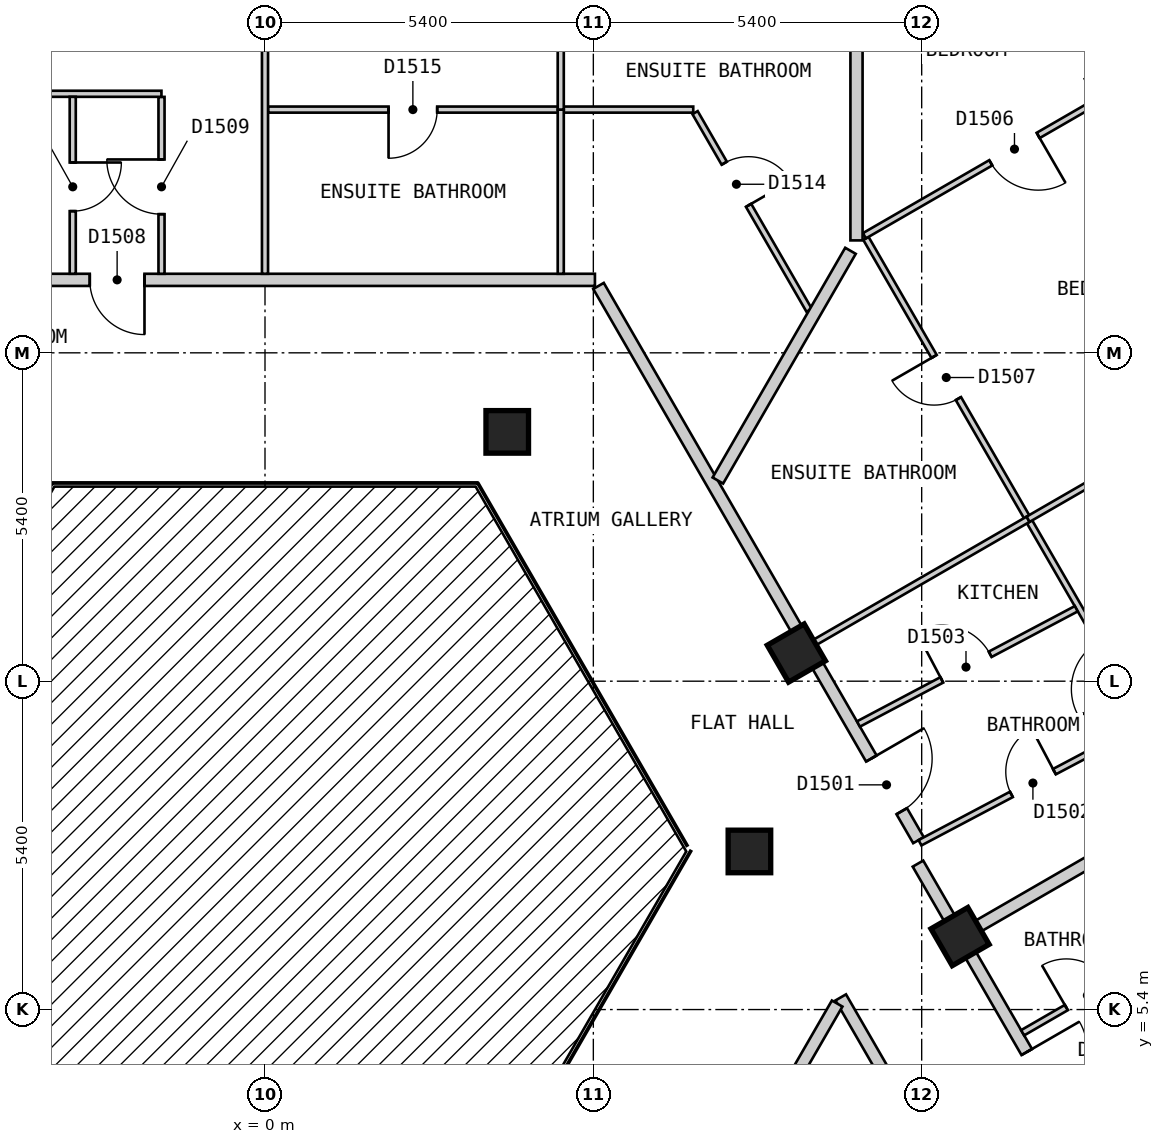
"""IFC4 building model, lengths in metres.
Left out: names, types, materials, properties, quantities, classifications, styles, units other than length and angle.
Written with IfcOpenShell. Run it as: python <this file> out.ifc"""

import sys

from ifc_helpers import new_model, si_unit, direction, frame, frame_2d, origin, origin_2d, place, context, subcontext, project, spatial, rectangle, extrude, element, fill, save


model = new_model("IFC4")
c1 = context("Model", 3, precision=1e-05, world=origin(), true_north=direction((0.0, 1.0)))
c2 = subcontext(c1, "Body", "Model", "MODEL_VIEW")
j1 = project(units=[si_unit("LENGTHUNIT", "METRE"), si_unit("PLANEANGLEUNIT", "RADIAN")], contexts=[c1])
p1 = place(None, origin())
s1 = spatial("IfcSite", under=j1, at=p1, CompositionType="ELEMENT")
p2 = place(p1, origin())
s2 = spatial("IfcBuilding", under=s1, at=p2, CompositionType="ELEMENT")
p3 = place(p2, frame((0.0, 0.0, 184.2)))
s3 = spatial("IfcBuildingStorey", under=s2, at=p3, CompositionType="ELEMENT", Elevation=184.2)
for number, where, z_axis, x_axis in (
    (1, (11.431, 6.6, 0.0), (0.0, 0.0, 1.0), (-0.5, 0.866, 0.0)),
    (2, (7.967, 8.0, 0.0), (0.0, 0.0, 1.0), (1.0, 0.0, 0.0)),
    (3, (8.739, 11.263, 0.0), (0.0, 0.0, 1.0), (-0.5, 0.866, 0.0)),
    (4, (3.984, 14.9, 0.0), (0.0, 0.0, 1.0), (1.0, 0.0, 0.0)),
):
    element("IfcColumn", number, at=place(p3, frame(where, z_axis=z_axis, x_axis=x_axis)), inside=s3, PredefinedType="COLUMN", context=c2, shape_type="SweptSolid", body=[
        extrude(rectangle(XDim=0.7, YDim=0.7, at=origin_2d()), origin(), (0.0, 0.0, 1.0), 3.0),
    ])
p4 = place(p3, frame((9.469, 5.6, 0.0), z_axis=(0.0, 0.0, 1.0), x_axis=(0.499964524401, -0.866045884662, 0.0)))
e5 = element("IfcWall", 5, at=p4, inside=s3, PredefinedType="PARTITIONING", context=c2, shape_type="SweptSolid", body=[
    extrude(rectangle(XDim=7.042, YDim=0.2, at=frame_2d((3.521, 0.0))), origin(), (0.0, 0.0, 1.0), 2.7),
])
p5 = place(p4, frame((3.129, 0.0, 0.0)))
e6 = element("IfcOpeningElement", 6, at=p5, cuts=e5, PredefinedType="OPENING", context=c2, shape_type="SweptSolid", body=[
    extrude(rectangle(XDim=0.9, YDim=2.1, at=frame_2d((0.45, 1.05))), frame((0.0, 0.11, 0.0), z_axis=(0.0, -1.0, 0.0), x_axis=(1.0, 0.0, 0.0)), (0.0, 0.0, 1.0), 0.22),
])
p6 = place(p3, frame((10.739, 7.8, 0.0), z_axis=(0.0, 0.0, 1.0), x_axis=(0.500023726918, -0.866011704609, 0.0)))
e7 = element("IfcWall", 7, at=p6, inside=s3, PredefinedType="PARTITIONING", context=c2, shape_type="SweptSolid", body=[
    extrude(rectangle(XDim=9.47, YDim=0.2, at=frame_2d((4.735, 0.0))), origin(), (0.0, 0.0, 1.0), 2.7),
])
p7 = place(p6, frame((8.168, 0.0, 0.0)))
e8 = element("IfcOpeningElement", 8, at=p7, cuts=e7, PredefinedType="OPENING", context=c2, shape_type="SweptSolid", body=[
    extrude(rectangle(XDim=1.0, YDim=2.1, at=frame_2d((0.5, 1.05))), frame((0.0, 0.11, 0.0), z_axis=(0.0, -1.0, 0.0), x_axis=(1.0, 0.0, 0.0)), (0.0, 0.0, 1.0), 0.22),
])
p8 = place(p6, frame((3.578, 0.0, 0.0)))
e9 = element("IfcOpeningElement", 9, at=p8, cuts=e7, PredefinedType="OPENING", context=c2, shape_type="SweptSolid", body=[
    extrude(rectangle(XDim=1.0, YDim=2.1, at=frame_2d((0.5, 1.05))), frame((0.0, 0.11, 0.0), z_axis=(0.0, -1.0, 0.0), x_axis=(1.0, 0.0, 0.0)), (0.0, 0.0, 1.0), 0.22),
])
p9 = place(p3, frame((5.485, 17.3, 0.0), z_axis=(0.0, 0.0, 1.0), x_axis=(0.499998905622, -0.866026035623, 0.0)))
e10 = element("IfcWall", 10, at=p9, inside=s3, PredefinedType="PARTITIONING", context=c2, shape_type="SweptSolid", body=[
    extrude(rectangle(XDim=10.524, YDim=0.2, at=frame_2d((5.262, 0.0))), origin(), (0.0, 0.0, 1.0), 2.7),
])
p10 = place(p9, frame((8.974, 0.0, 0.0)))
e11 = element("IfcOpeningElement", 11, at=p10, cuts=e10, PredefinedType="OPENING", context=c2, shape_type="SweptSolid", body=[
    extrude(rectangle(XDim=1.0, YDim=2.1, at=frame_2d((0.5, 1.05))), frame((0.0, 0.11, 0.0), z_axis=(0.0, -1.0, 0.0), x_axis=(1.0, 0.0, 0.0)), (0.0, 0.0, 1.0), 0.22),
])
p11 = place(p3, frame((-5.311, 17.4, 0.0), z_axis=(0.0, 0.0, 1.0), x_axis=(1.0, 0.0, 0.0)))
e12 = element("IfcWall", 12, at=p11, inside=s3, PredefinedType="PARTITIONING", context=c2, shape_type="SweptSolid", body=[
    extrude(rectangle(XDim=10.737, YDim=0.2, at=frame_2d((5.369, 0.0))), origin(), (0.0, 0.0, 1.0), 2.7),
])
p12 = place(p11, frame((2.429, 0.0, 0.0)))
e13 = element("IfcOpeningElement", 13, at=p12, cuts=e12, PredefinedType="OPENING", context=c2, shape_type="SweptSolid", body=[
    extrude(rectangle(XDim=0.9, YDim=2.1, at=frame_2d((0.45, 1.05))), frame((0.0, 0.11, 0.0), z_axis=(0.0, -1.0, 0.0), x_axis=(1.0, 0.0, 0.0)), (0.0, 0.0, 1.0), 0.22),
])
p13 = place(p3, frame((7.028, 1.373, 0.0), z_axis=(0.0, 0.0, 1.0), x_axis=(0.499953126767, 0.866052464367, 0.0)))
e14 = element("IfcWall", 14, at=p13, inside=s3, PredefinedType="PARTITIONING", context=c2, shape_type="SweptSolid", body=[
    extrude(rectangle(XDim=4.764, YDim=0.2, at=frame_2d((2.382, 0.0))), origin(), (0.0, 0.0, 1.0), 2.7),
])
p14 = place(p3, frame((7.073, 20.15, 0.0), z_axis=(0.0, 0.0, 1.0), x_axis=(0.499917691695, -0.866072919292, 0.0)))
e15 = element("IfcWall", 15, at=p14, inside=s3, PredefinedType="PARTITIONING", context=c2, shape_type="SweptSolid", body=[
    extrude(rectangle(XDim=3.753, YDim=0.1, at=frame_2d((1.876, 0.0))), origin(), (0.0, 0.0, 1.0), 2.7),
])
p15 = place(p14, frame((0.96, 0.0, 0.0)))
e16 = element("IfcOpeningElement", 16, at=p15, cuts=e15, PredefinedType="OPENING", context=c2, shape_type="SweptSolid", body=[
    extrude(rectangle(XDim=0.8, YDim=2.1, at=frame_2d((0.4, 1.05))), frame((0.0, 0.06, 0.0), z_axis=(0.0, -1.0, 0.0), x_axis=(1.0, 0.0, 0.0)), (0.0, 0.0, 1.0), 0.12),
])
p16 = place(p3, frame((9.883, 18.082, 0.0), z_axis=(0.0, 0.0, 1.0), x_axis=(0.500004428835, -0.86602284678, 0.0)))
e17 = element("IfcWall", 17, at=p16, inside=s3, PredefinedType="PARTITIONING", context=c2, shape_type="SweptSolid", body=[
    extrude(rectangle(XDim=10.618, YDim=0.1, at=frame_2d((5.309, 0.0))), origin(), (0.0, 0.0, 1.0), 2.7),
])
p17 = place(p16, frame((7.657, 0.0, 0.0)))
e18 = element("IfcOpeningElement", 18, at=p17, cuts=e17, PredefinedType="OPENING", context=c2, shape_type="SweptSolid", body=[
    extrude(rectangle(XDim=0.9, YDim=2.1, at=frame_2d((0.45, 1.05))), frame((0.0, 0.06, 0.0), z_axis=(0.0, -1.0, 0.0), x_axis=(1.0, 0.0, 0.0)), (0.0, 0.0, 1.0), 0.12),
])
p18 = place(p16, frame((2.242, 0.0, 0.0)))
e19 = element("IfcOpeningElement", 19, at=p18, cuts=e17, PredefinedType="OPENING", context=c2, shape_type="SweptSolid", body=[
    extrude(rectangle(XDim=0.8, YDim=2.1, at=frame_2d((0.4, 1.05))), frame((0.0, 0.06, 0.0), z_axis=(0.0, -1.0, 0.0), x_axis=(1.0, 0.0, 0.0)), (0.0, 0.0, 1.0), 0.12),
])
p19 = place(p3, frame((-1.702, 20.409, 0.0), z_axis=(0.0, 0.0, 1.0), x_axis=(0.0, -1.0, 0.0)))
e20 = element("IfcWall", 20, at=p19, inside=s3, PredefinedType="PARTITIONING", context=c2, shape_type="SweptSolid", body=[
    extrude(rectangle(XDim=2.909, YDim=0.1, at=frame_2d((1.455, 0.0))), origin(), (0.0, 0.0, 1.0), 2.7),
])
p20 = place(p19, frame((1.029, 0.0, 0.0)))
e21 = element("IfcOpeningElement", 21, at=p20, cuts=e20, PredefinedType="OPENING", context=c2, shape_type="SweptSolid", body=[
    extrude(rectangle(XDim=0.9, YDim=2.1, at=frame_2d((0.45, 1.05))), frame((0.0, 0.06, 0.0), z_axis=(0.0, -1.0, 0.0), x_axis=(1.0, 0.0, 0.0)), (0.0, 0.0, 1.0), 0.12),
])
p21 = place(p3, frame((0.05, 20.2, 0.0), z_axis=(0.0, 0.0, 1.0), x_axis=(1.0, 0.0, 0.0)))
e22 = element("IfcWall", 22, at=p21, inside=s3, PredefinedType="PARTITIONING", context=c2, shape_type="SweptSolid", body=[
    extrude(rectangle(XDim=6.993, YDim=0.1, at=frame_2d((3.497, 0.0))), origin(), (0.0, 0.0, 1.0), 2.7),
])
p22 = place(p21, frame((1.982, 0.0, 0.0)))
e23 = element("IfcOpeningElement", 23, at=p22, cuts=e22, PredefinedType="OPENING", context=c2, shape_type="SweptSolid", body=[
    extrude(rectangle(XDim=0.8, YDim=2.1, at=frame_2d((0.4, 1.05))), frame((0.0, 0.06, 0.0), z_axis=(0.0, -1.0, 0.0), x_axis=(1.0, 0.0, 0.0)), (0.0, 0.0, 1.0), 0.12),
])
p23 = place(p3, frame((-4.814, 20.46, 0.0), z_axis=(0.0, 0.0, 1.0), x_axis=(1.0, 0.0, 0.0)))
e24 = element("IfcWall", 24, at=p23, inside=s3, PredefinedType="PARTITIONING", context=c2, shape_type="SweptSolid", body=[
    extrude(rectangle(XDim=3.111, YDim=0.1, at=frame_2d((1.556, 0.0))), origin(), (0.0, 0.0, 1.0), 2.7),
])
p24 = place(p3, frame((4.864, 17.5, 0.0), z_axis=(0.0, 0.0, 1.0), x_axis=(0.0, 1.0, 0.0)))
e25 = element("IfcWall", 25, at=p24, inside=s3, PredefinedType="PARTITIONING", context=c2, shape_type="SweptSolid", body=[
    extrude(rectangle(XDim=2.7, YDim=0.1, at=frame_2d((1.35, 0.0))), origin(), (0.0, 0.0, 1.0), 2.7),
])
p25 = place(p3, frame((0.0, 17.5, 0.0), z_axis=(0.0, 0.0, 1.0), x_axis=(0.0, 1.0, 0.0)))
e26 = element("IfcWall", 26, at=p25, inside=s3, PredefinedType="PARTITIONING", context=c2, shape_type="SweptSolid", body=[
    extrude(rectangle(XDim=6.4, YDim=0.1, at=frame_2d((3.2, 0.0))), origin(), (0.0, 0.0, 1.0), 2.7),
])
p26 = place(p25, frame((4.1, 0.0, 0.0)))
e27 = element("IfcOpeningElement", 27, at=p26, cuts=e26, PredefinedType="OPENING", context=c2, shape_type="SweptSolid", body=[
    extrude(rectangle(XDim=0.9, YDim=2.1, at=frame_2d((0.45, 1.05))), frame((0.0, 0.06, 0.0), z_axis=(0.0, -1.0, 0.0), x_axis=(1.0, 0.0, 0.0)), (0.0, 0.0, 1.0), 0.12),
])
p27 = place(p3, frame((-3.162, 17.5, 0.0), z_axis=(0.0, 0.0, 1.0), x_axis=(0.0, 1.0, 0.0)))
e28 = element("IfcWall", 28, at=p27, inside=s3, PredefinedType="PARTITIONING", context=c2, shape_type="SweptSolid", body=[
    extrude(rectangle(XDim=2.91, YDim=0.1, at=frame_2d((1.455, 0.0))), origin(), (0.0, 0.0, 1.0), 2.7),
])
p28 = place(p27, frame((1.03, 0.0, 0.0)))
e29 = element("IfcOpeningElement", 29, at=p28, cuts=e28, PredefinedType="OPENING", context=c2, shape_type="SweptSolid", body=[
    extrude(rectangle(XDim=0.8, YDim=2.1, at=frame_2d((0.4, 1.05))), frame((0.0, 0.06, 0.0), z_axis=(0.0, -1.0, 0.0), x_axis=(1.0, 0.0, 0.0)), (0.0, 0.0, 1.0), 0.12),
])
p29 = place(p3, frame((9.76, 10.096, 0.0), z_axis=(0.0, 0.0, 1.0), x_axis=(0.883925629136, 0.467627503636, 0.0)))
e30 = element("IfcWall", 30, at=p29, inside=s3, PredefinedType="PARTITIONING", context=c2, shape_type="SweptSolid", body=[
    extrude(rectangle(XDim=4.052, YDim=0.1, at=frame_2d((2.026, 0.0))), origin(), (0.0, 0.0, 1.0), 2.7),
])
p30 = place(p29, frame((1.551, 0.0, 0.0)))
e31 = element("IfcOpeningElement", 31, at=p30, cuts=e30, PredefinedType="OPENING", context=c2, shape_type="SweptSolid", body=[
    extrude(rectangle(XDim=0.9, YDim=2.1, at=frame_2d((0.45, 1.05))), frame((0.0, 0.06, 0.0), z_axis=(0.0, -1.0, 0.0), x_axis=(1.0, 0.0, 0.0)), (0.0, 0.0, 1.0), 0.12),
])
p31 = place(p3, frame((10.772, 8.143, 0.0), z_axis=(0.0, 0.0, 1.0), x_axis=(0.884049480227, 0.467393320995, 0.0)))
e32 = element("IfcWall", 32, at=p31, inside=s3, PredefinedType="PARTITIONING", context=c2, shape_type="SweptSolid", body=[
    extrude(rectangle(XDim=4.153, YDim=0.1, at=frame_2d((2.076, 0.0))), origin(), (0.0, 0.0, 1.0), 2.7),
])
p32 = place(p31, frame((1.701, 0.0, 0.0)))
e33 = element("IfcOpeningElement", 33, at=p32, cuts=e32, PredefinedType="OPENING", context=c2, shape_type="SweptSolid", body=[
    extrude(rectangle(XDim=0.8, YDim=2.1, at=frame_2d((0.4, 1.05))), frame((0.0, 0.06, 0.0), z_axis=(0.0, -1.0, 0.0), x_axis=(1.0, 0.0, 0.0)), (0.0, 0.0, 1.0), 0.12),
])
p33 = place(p3, frame((13.268, 3.619, 0.0), z_axis=(0.0, 0.0, 1.0), x_axis=(0.865902724456, 0.500212426655, 0.0)))
e34 = element("IfcWall", 34, at=p33, inside=s3, PredefinedType="PARTITIONING", context=c2, shape_type="SweptSolid", body=[
    extrude(rectangle(XDim=2.559, YDim=0.1, at=frame_2d((1.28, 0.0))), origin(), (0.0, 0.0, 1.0), 2.7),
])
p34 = place(p33, frame((0.78, 0.0, 0.0)))
e35 = element("IfcOpeningElement", 35, at=p34, cuts=e34, PredefinedType="OPENING", context=c2, shape_type="SweptSolid", body=[
    extrude(rectangle(XDim=0.9, YDim=2.1, at=frame_2d((0.45, 1.05))), frame((0.0, 0.06, 0.0), z_axis=(0.0, -1.0, 0.0), x_axis=(1.0, 0.0, 0.0)), (0.0, 0.0, 1.0), 0.12),
])
p35 = place(p3, frame((12.46, 5.018, 0.0), z_axis=(0.0, 0.0, 1.0), x_axis=(0.866080321209, 0.499904868165, 0.0)))
e36 = element("IfcWall", 36, at=p35, inside=s3, PredefinedType="PARTITIONING", context=c2, shape_type="SweptSolid", body=[
    extrude(rectangle(XDim=2.51, YDim=0.1, at=frame_2d((1.255, 0.0))), origin(), (0.0, 0.0, 1.0), 2.7),
])
p36 = place(p35, frame((0.83, 0.0, 0.0)))
e37 = element("IfcOpeningElement", 37, at=p36, cuts=e36, PredefinedType="OPENING", context=c2, shape_type="SweptSolid", body=[
    extrude(rectangle(XDim=0.8, YDim=2.1, at=frame_2d((0.4, 1.05))), frame((0.0, 0.06, 0.0), z_axis=(0.0, -1.0, 0.0), x_axis=(1.0, 0.0, 0.0)), (0.0, 0.0, 1.0), 0.12),
])
p37 = place(p3, frame((8.999, 11.413, 0.0), z_axis=(0.0, 0.0, 1.0), x_axis=(0.86606561423, 0.499930346997, 0.0)))
e38 = element("IfcWall", 38, at=p37, inside=s3, PredefinedType="PARTITIONING", context=c2, shape_type="SweptSolid", body=[
    extrude(rectangle(XDim=4.1, YDim=0.1, at=frame_2d((2.05, 0.0))), origin(), (0.0, 0.0, 1.0), 2.7),
])
p38 = place(p3, frame((9.858, 18.125, 0.0), z_axis=(0.0, 0.0, 1.0), x_axis=(0.866004402611, 0.500036373335, 0.0)))
e39 = element("IfcWall", 39, at=p38, inside=s3, PredefinedType="PARTITIONING", context=c2, shape_type="SweptSolid", body=[
    extrude(rectangle(XDim=5.7, YDim=0.1, at=frame_2d((2.85, 0.0))), origin(), (0.0, 0.0, 1.0), 2.7),
])
p39 = place(p38, frame((2.4, 0.0, 0.0)))
e40 = element("IfcOpeningElement", 40, at=p39, cuts=e39, PredefinedType="OPENING", context=c2, shape_type="SweptSolid", body=[
    extrude(rectangle(XDim=0.9, YDim=2.1, at=frame_2d((0.45, 1.05))), frame((0.0, 0.06, 0.0), z_axis=(0.0, -1.0, 0.0), x_axis=(1.0, 0.0, 0.0)), (0.0, 0.0, 1.0), 0.12),
])
p40 = place(p3, frame((7.448, 14.1, 0.0), z_axis=(0.0, 0.0, 1.0), x_axis=(0.499961462843, 0.866047652079, 0.0)))
e41 = element("IfcWall", 41, at=p40, inside=s3, PredefinedType="PARTITIONING", context=c2, shape_type="SweptSolid", body=[
    extrude(rectangle(XDim=4.362, YDim=0.2, at=frame_2d((2.181, 0.0))), origin(), (0.0, 0.0, 1.0), 2.7),
])
p41 = place(p3, frame((9.728, 18.049, 0.0), z_axis=(0.0, 0.0, 1.0), x_axis=(0.0, 1.0, 0.0)))
e42 = element("IfcWall", 42, at=p41, inside=s3, PredefinedType="PARTITIONING", context=c2, shape_type="SweptSolid", body=[
    extrude(rectangle(XDim=5.851, YDim=0.2, at=frame_2d((2.925, 0.0))), origin(), (0.0, 0.0, 1.0), 2.7),
])
p42 = place(p3, frame((11.518, 6.65, 0.0), z_axis=(0.0, 0.0, 1.0), x_axis=(0.866016855193, 0.500014806302, 0.0)))
e43 = element("IfcWall", 43, at=p42, inside=s3, PredefinedType="PARTITIONING", context=c2, shape_type="SweptSolid", body=[
    extrude(rectangle(XDim=10.0, YDim=0.2, at=frame_2d((5.0, 0.0))), origin(), (0.0, 0.0, 1.0), 2.7),
])
p43 = place(p3, frame((12.55, 13.463, 0.0), z_axis=(0.0, 0.0, 1.0), x_axis=(0.866004402611, 0.500036373335, 0.0)))
e44 = element("IfcWall", 44, at=p43, inside=s3, PredefinedType="PARTITIONING", context=c2, shape_type="SweptSolid", body=[
    extrude(rectangle(XDim=5.7, YDim=0.1, at=frame_2d((2.85, 0.0))), origin(), (0.0, 0.0, 1.0), 2.7),
])
p44 = place(p43, frame((2.4, 0.0, 0.0)))
e45 = element("IfcOpeningElement", 45, at=p44, cuts=e44, PredefinedType="OPENING", context=c2, shape_type="SweptSolid", body=[
    extrude(rectangle(XDim=0.9, YDim=2.1, at=frame_2d((0.45, 1.05))), frame((0.0, 0.06, 0.0), z_axis=(0.0, -1.0, 0.0), x_axis=(1.0, 0.0, 0.0)), (0.0, 0.0, 1.0), 0.12),
])
p45 = place(p3, frame((4.864, 20.2, 0.0), z_axis=(0.0, 0.0, 1.0), x_axis=(0.0, 1.0, 0.0)))
e46 = element("IfcWall", 46, at=p45, inside=s3, PredefinedType="PARTITIONING", context=c2, shape_type="SweptSolid", body=[
    extrude(rectangle(XDim=3.7, YDim=0.1, at=frame_2d((1.85, 0.0))), origin(), (0.0, 0.0, 1.0), 2.7),
])
p46 = place(p45, frame((1.4, 0.0, 0.0)))
e47 = element("IfcOpeningElement", 47, at=p46, cuts=e46, PredefinedType="OPENING", context=c2, shape_type="SweptSolid", body=[
    extrude(rectangle(XDim=0.9, YDim=2.1, at=frame_2d((0.45, 1.05))), frame((0.0, 0.06, 0.0), z_axis=(0.0, -1.0, 0.0), x_axis=(1.0, 0.0, 0.0)), (0.0, 0.0, 1.0), 0.12),
])
p47 = place(p10, origin())
e48 = element("IfcDoor", 48, at=p47, inside=s3, OperationType="SINGLE_SWING_LEFT", PredefinedType="DOOR", context=c2, shape_type="SweptSolid", body=[
    extrude(rectangle(XDim=1.0, YDim=2.1, at=frame_2d((0.5, 1.05))), frame((0.0, 0.025, 0.0), z_axis=(0.0, -1.0, 0.0), x_axis=(1.0, 0.0, 0.0)), (0.0, 0.0, 1.0), 0.05),
])
fill(e11, e48)
p48 = place(p32, origin())
e49 = element("IfcDoor", 49, at=p48, inside=s3, OperationType="SINGLE_SWING_RIGHT", PredefinedType="DOOR", context=c2, shape_type="SweptSolid", body=[
    extrude(rectangle(XDim=0.8, YDim=2.1, at=frame_2d((0.4, 1.05))), frame((0.0, 0.025, 0.0), z_axis=(0.0, -1.0, 0.0), x_axis=(1.0, 0.0, 0.0)), (0.0, 0.0, 1.0), 0.05),
])
fill(e33, e49)
p49 = place(p30, origin())
e50 = element("IfcDoor", 50, at=p49, inside=s3, OperationType="SINGLE_SWING_LEFT", PredefinedType="DOOR", context=c2, shape_type="SweptSolid", body=[
    extrude(rectangle(XDim=0.9, YDim=2.1, at=frame_2d((0.45, 1.05))), frame((0.0, 0.025, 0.0), z_axis=(0.0, -1.0, 0.0), x_axis=(1.0, 0.0, 0.0)), (0.0, 0.0, 1.0), 0.05),
])
fill(e31, e50)
p50 = place(p39, origin())
e51 = element("IfcDoor", 51, at=p50, inside=s3, OperationType="SINGLE_SWING_RIGHT", PredefinedType="DOOR", context=c2, shape_type="SweptSolid", body=[
    extrude(rectangle(XDim=0.9, YDim=2.1, at=frame_2d((0.45, 1.05))), frame((0.0, 0.025, 0.0), z_axis=(0.0, -1.0, 0.0), x_axis=(1.0, 0.0, 0.0)), (0.0, 0.0, 1.0), 0.05),
])
fill(e40, e51)
p51 = place(p18, origin())
e52 = element("IfcDoor", 52, at=p51, inside=s3, OperationType="SINGLE_SWING_LEFT", PredefinedType="DOOR", context=c2, shape_type="SweptSolid", body=[
    extrude(rectangle(XDim=0.8, YDim=2.1, at=frame_2d((0.4, 1.05))), frame((0.0, 0.025, 0.0), z_axis=(0.0, -1.0, 0.0), x_axis=(1.0, 0.0, 0.0)), (0.0, 0.0, 1.0), 0.05),
])
fill(e19, e52)
p52 = place(p12, origin())
e53 = element("IfcDoor", 53, at=p52, inside=s3, OperationType="SINGLE_SWING_RIGHT", PredefinedType="DOOR", context=c2, shape_type="SweptSolid", body=[
    extrude(rectangle(XDim=0.9, YDim=2.1, at=frame_2d((0.45, 1.05))), frame((0.0, 0.025, 0.0), z_axis=(0.0, -1.0, 0.0), x_axis=(1.0, 0.0, 0.0)), (0.0, 0.0, 1.0), 0.05),
])
fill(e13, e53)
p53 = place(p20, origin())
e54 = element("IfcDoor", 54, at=p53, inside=s3, OperationType="SINGLE_SWING_LEFT", PredefinedType="DOOR", context=c2, shape_type="SweptSolid", body=[
    extrude(rectangle(XDim=0.9, YDim=2.1, at=frame_2d((0.45, 1.05))), frame((0.0, 0.025, 0.0), z_axis=(0.0, -1.0, 0.0), x_axis=(1.0, 0.0, 0.0)), (0.0, 0.0, 1.0), 0.05),
])
fill(e21, e54)
p54 = place(p28, origin())
e55 = element("IfcDoor", 55, at=p54, inside=s3, OperationType="SINGLE_SWING_RIGHT", PredefinedType="DOOR", context=c2, shape_type="SweptSolid", body=[
    extrude(rectangle(XDim=0.8, YDim=2.1, at=frame_2d((0.4, 1.05))), frame((0.0, 0.025, 0.0), z_axis=(0.0, -1.0, 0.0), x_axis=(1.0, 0.0, 0.0)), (0.0, 0.0, 1.0), 0.05),
])
fill(e29, e55)
p55 = place(p15, origin())
e56 = element("IfcDoor", 56, at=p55, inside=s3, OperationType="SINGLE_SWING_RIGHT", PredefinedType="DOOR", context=c2, shape_type="SweptSolid", body=[
    extrude(rectangle(XDim=0.8, YDim=2.1, at=frame_2d((0.4, 1.05))), frame((0.0, 0.025, 0.0), z_axis=(0.0, -1.0, 0.0), x_axis=(1.0, 0.0, 0.0)), (0.0, 0.0, 1.0), 0.05),
])
fill(e16, e56)
p56 = place(p22, origin())
e57 = element("IfcDoor", 57, at=p56, inside=s3, OperationType="SINGLE_SWING_LEFT", PredefinedType="DOOR", context=c2, shape_type="SweptSolid", body=[
    extrude(rectangle(XDim=0.8, YDim=2.1, at=frame_2d((0.4, 1.05))), frame((0.0, 0.025, 0.0), z_axis=(0.0, -1.0, 0.0), x_axis=(1.0, 0.0, 0.0)), (0.0, 0.0, 1.0), 0.05),
])
fill(e23, e57)
p57 = place(p8, origin())
e58 = element("IfcDoor", 58, at=p57, inside=s3, OperationType="SINGLE_SWING_LEFT", PredefinedType="DOOR", context=c2, shape_type="SweptSolid", body=[
    extrude(rectangle(XDim=1.0, YDim=2.1, at=frame_2d((0.5, 1.05))), frame((0.0, 0.025, 0.0), z_axis=(0.0, -1.0, 0.0), x_axis=(1.0, 0.0, 0.0)), (0.0, 0.0, 1.0), 0.05),
])
fill(e9, e58)
p58 = place(p36, origin())
e59 = element("IfcDoor", 59, at=p58, inside=s3, OperationType="SINGLE_SWING_LEFT", PredefinedType="DOOR", context=c2, shape_type="SweptSolid", body=[
    extrude(rectangle(XDim=0.8, YDim=2.1, at=frame_2d((0.4, 1.05))), frame((0.0, 0.025, 0.0), z_axis=(0.0, -1.0, 0.0), x_axis=(1.0, 0.0, 0.0)), (0.0, 0.0, 1.0), 0.05),
])
fill(e37, e59)
save(model, sys.argv[1])
